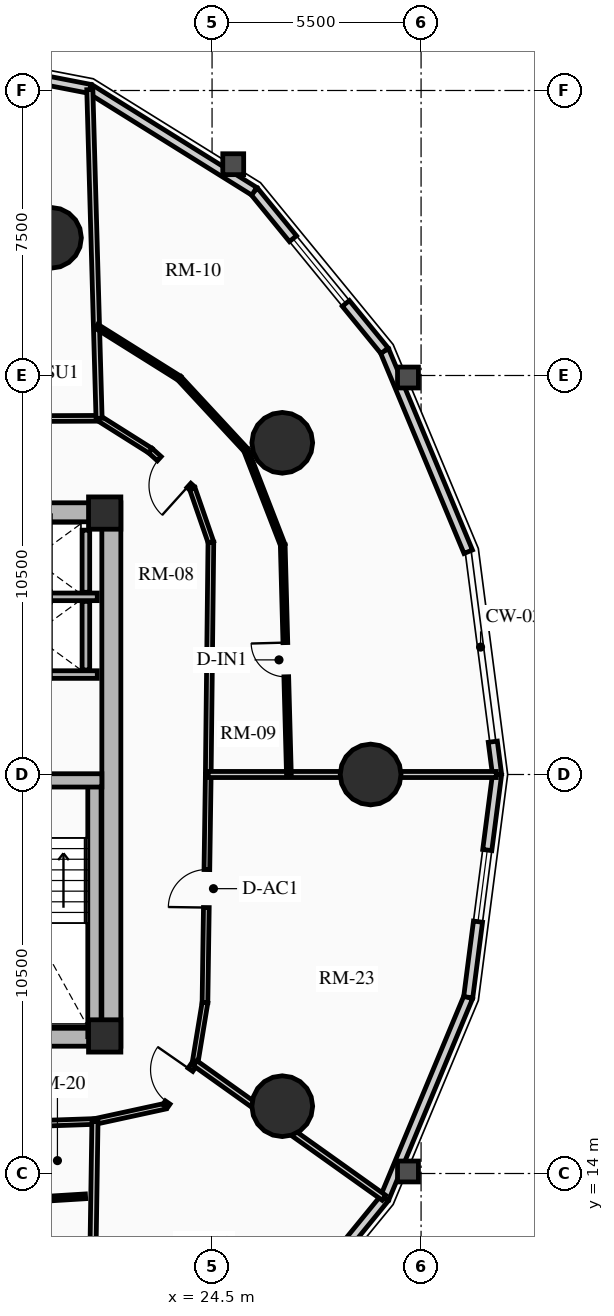
"""IFC4 building model, lengths in metres.
Left out: names, types, materials, properties, quantities, classifications, styles, units other than length and angle.
Written with IfcOpenShell. Run it as: python <this file> out.ifc"""

import sys

from ifc_helpers import new_model, si_unit, direction, frame, frame_2d, origin, origin_2d, place, context, subcontext, project, spatial, rectangle, circle, extrude, source, transform, mapped, element, fill, save


model = new_model("IFC4")
c1 = context("Model", 3, precision=1e-05, world=origin(), true_north=direction((0.0, 1.0)))
c2 = subcontext(c1, "Body", "Model", "MODEL_VIEW")
j1 = project(units=[si_unit("LENGTHUNIT", "METRE"), si_unit("PLANEANGLEUNIT", "RADIAN")], contexts=[c1])
p1 = place(None, origin())
s1 = spatial("IfcSite", under=j1, at=p1, CompositionType="ELEMENT")
p2 = place(p1, origin())
s2 = spatial("IfcBuilding", under=s1, at=p2, CompositionType="ELEMENT")
p3 = place(p2, frame((0.0, 0.0, 45.28)))
s3 = spatial("IfcBuildingStorey", under=s2, at=p3, CompositionType="ELEMENT", Elevation=45.28)
p4 = place(p3, frame((21.85, 17.35, 0.0), z_axis=(0.0, 0.0, 1.0), x_axis=(0.0, 1.0, 0.0)))
e1 = element("IfcWall", 1, at=p4, inside=s3, PredefinedType="SHEAR", context=c2, shape_type="SweptSolid", body=[
    extrude(rectangle(XDim=14.3, YDim=0.5, at=frame_2d((7.15, 0.0))), origin(), (0.0, 0.0, 1.0), 2.91),
])
p5 = place(p3, frame((11.15, 17.6, 0.0), z_axis=(0.0, 0.0, 1.0), x_axis=(1.0, 0.0, 0.0)))
e2 = element("IfcWall", 2, at=p5, inside=s3, PredefinedType="SHEAR", context=c2, shape_type="SweptSolid", body=[
    extrude(rectangle(XDim=10.7, YDim=0.5, at=frame_2d((5.35, 0.0))), origin(), (0.0, 0.0, 1.0), 2.91),
])
m1 = source(origin(), c2, "Body", "SweptSolid", [
    extrude(rectangle(XDim=1.5, YDim=2.02, at=frame_2d((0.75, 1.01))), frame((0.0, 0.26, 0.0), z_axis=(0.0, -1.0, 0.0), x_axis=(1.0, 0.0, 0.0)), (0.0, 0.0, 1.0), 0.52),
])
p6 = place(p5, frame((5.45, 0.0, 0.0)))
e3 = element("IfcOpeningElement", 3, at=p6, cuts=e2, PredefinedType="OPENING", context=c2, shape_type="MappedRepresentation", body=[
    mapped(m1, transform((0.0, 0.0, 0.0), x_axis=(1.0, 0.0, 0.0), y_axis=(0.0, 1.0, 0.0), z_axis=(0.0, 0.0, 1.0), scale=1.0)),
])
p7 = place(p3, frame((11.15, 31.4, 0.0), z_axis=(0.0, 0.0, 1.0), x_axis=(1.0, 0.0, 0.0)))
e4 = element("IfcWall", 4, at=p7, inside=s3, PredefinedType="SHEAR", context=c2, shape_type="SweptSolid", body=[
    extrude(rectangle(XDim=10.7, YDim=0.5, at=frame_2d((5.35, 0.0))), origin(), (0.0, 0.0, 1.0), 2.91),
])
p8 = place(p7, frame((4.6, 0.0, 0.0)))
e5 = element("IfcOpeningElement", 5, at=p8, cuts=e4, PredefinedType="OPENING", context=c2, shape_type="MappedRepresentation", body=[
    mapped(m1, transform((0.0, 0.0, 0.0), x_axis=(1.0, 0.0, 0.0), y_axis=(0.0, 1.0, 0.0), z_axis=(0.0, 0.0, 1.0), scale=1.0)),
])
p9 = place(p3, frame((21.405, 17.6, 0.0), z_axis=(0.0, 0.0, 1.0), x_axis=(0.0, 1.0, 0.0)))
e6 = element("IfcWall", 6, at=p9, inside=s3, PredefinedType="SHEAR", context=c2, shape_type="SweptSolid", body=[
    extrude(rectangle(XDim=6.745, YDim=0.35, at=frame_2d((3.373, 0.0))), origin(), (0.0, 0.0, 1.0), 2.91),
])
p10 = place(p3, frame((18.315, 24.345, 0.0), z_axis=(0.0, 0.0, 1.0), x_axis=(1.0, 0.0, 0.0)))
e7 = element("IfcWall", 7, at=p10, inside=s3, PredefinedType="SHEAR", context=c2, shape_type="SweptSolid", body=[
    extrude(rectangle(XDim=3.285, YDim=0.35, at=frame_2d((1.643, 0.0))), origin(), (0.0, 0.0, 1.0), 2.91),
])
for number, where, z_axis, x_axis in (
    (8, (21.675, 17.62, 0.0), (0.0, 0.0, 1.0), (1.0, 0.0, 0.0)),
    (9, (21.675, 31.38, 0.0), (0.0, 0.0, 1.0), (1.0, 0.0, 0.0)),
):
    element("IfcColumn", number, at=place(p3, frame(where, z_axis=z_axis, x_axis=x_axis)), inside=s3, PredefinedType="COLUMN", context=c2, shape_type="SweptSolid", body=[
        extrude(rectangle(XDim=0.85, YDim=0.85, at=origin_2d()), origin(), (0.0, 0.0, 1.0), 2.91),
    ])
for number, where, z_axis, x_axis in (
    (10, (28.672, 24.5, 0.0), (0.0, 0.0, 1.0), (1.0, 0.0, 0.0)),
    (11, (26.347, 33.229, 0.0), (0.0, 0.0, 1.0), (1.0, 0.0, 0.0)),
    (12, (20.261, 38.623, 0.0), (0.0, 0.0, 1.0), (1.0, 0.0, 0.0)),
    (13, (26.347, 15.771, 0.0), (0.0, 0.0, 1.0), (1.0, 0.0, 0.0)),
):
    element("IfcColumn", number, at=place(p3, frame(where, z_axis=z_axis, x_axis=x_axis)), inside=s3, PredefinedType="USERDEFINED", context=c2, shape_type="SweptSolid", body=[
        extrude(circle(Radius=0.8, at=origin_2d()), origin(), (0.0, 0.0, 1.0), 2.91),
    ])
p11 = place(p3, frame((31.887, 25.363, 0.0), z_axis=(0.0, 0.0, 1.0), x_axis=(0.128523364007, -0.991706481225, 0.0)))
e14 = element("IfcWall", 14, at=p11, inside=s3, PredefinedType="SOLIDWALL", context=c2, shape_type="SweptSolid", body=[
    extrude(rectangle(XDim=0.87, YDim=0.24, at=frame_2d((0.435, 0.0))), origin(), (0.0, 0.0, 1.0), 2.635),
])
p12 = place(p3, frame((29.039, 35.65, 0.0), z_axis=(0.0, 0.0, 1.0), x_axis=(0.38430970593, -0.923204229804, 0.0)))
e15 = element("IfcWall", 15, at=p12, inside=s3, PredefinedType="SOLIDWALL", context=c2, shape_type="SweptSolid", body=[
    extrude(rectangle(XDim=5.728, YDim=0.24, at=frame_2d((2.864, 0.0))), origin(), (0.0, 0.0, 1.0), 2.073),
])
p13 = place(p3, frame((25.61, 39.847, 0.0), z_axis=(0.0, 0.0, 1.0), x_axis=(0.632710215588, -0.774388651189, 0.0)))
e16 = element("IfcWall", 16, at=p13, inside=s3, PredefinedType="SOLIDWALL", context=c2, shape_type="SweptSolid", body=[
    extrude(rectangle(XDim=5.419, YDim=0.24, at=frame_2d((2.71, 0.0))), origin(), (0.0, 0.0, 1.0), 2.073),
])
m2 = source(origin(), c2, "Body", "SweptSolid", [
    extrude(rectangle(XDim=2.2, YDim=1.35, at=frame_2d((1.1, 0.675))), frame((0.0, 0.13, 0.0), z_axis=(0.0, -1.0, 0.0), x_axis=(1.0, 0.0, 0.0)), (0.0, 0.0, 1.0), 0.26),
])
p14 = place(p13, frame((1.61, 0.0, 0.65)))
e17 = element("IfcOpeningElement", 17, at=p14, cuts=e16, PredefinedType="OPENING", context=c2, shape_type="MappedRepresentation", body=[
    mapped(m2, transform((0.0, 0.0, 0.0), x_axis=(1.0, 0.0, 0.0), y_axis=(0.0, 1.0, 0.0), z_axis=(0.0, 0.0, 1.0), scale=1.0)),
])
p15 = place(p3, frame((21.29, 42.542, 0.0), z_axis=(0.0, 0.0, 1.0), x_axis=(0.848528534887, -0.529149624853, 0.0)))
e18 = element("IfcWall", 18, at=p15, inside=s3, PredefinedType="SOLIDWALL", context=c2, shape_type="SweptSolid", body=[
    extrude(rectangle(XDim=5.092, YDim=0.24, at=frame_2d((2.546, 0.0))), origin(), (0.0, 0.0, 1.0), 2.073),
])
p16 = place(p3, frame((16.5, 43.47, 0.0), z_axis=(0.0, 0.0, 1.0), x_axis=(0.981724094622, -0.190309752872, 0.0)))
e19 = element("IfcWall", 19, at=p16, inside=s3, PredefinedType="SOLIDWALL", context=c2, shape_type="SweptSolid", body=[
    extrude(rectangle(XDim=4.879, YDim=0.24, at=frame_2d((2.439, 0.0))), origin(), (0.0, 0.0, 1.0), 2.073),
])
m3 = source(origin(), c2, "Body", "SweptSolid", [
    extrude(rectangle(XDim=1.9, YDim=1.35, at=frame_2d((0.95, 0.675))), frame((0.0, 0.13, 0.0), z_axis=(0.0, -1.0, 0.0), x_axis=(1.0, 0.0, 0.0)), (0.0, 0.0, 1.0), 0.26),
])
p17 = place(p16, frame((1.489, 0.0, 0.65)))
e20 = element("IfcOpeningElement", 20, at=p17, cuts=e19, PredefinedType="OPENING", context=c2, shape_type="MappedRepresentation", body=[
    mapped(m3, transform((0.0, 0.0, 0.0), x_axis=(1.0, 0.0, 0.0), y_axis=(0.0, 1.0, 0.0), z_axis=(0.0, 0.0, 1.0), scale=1.0)),
])
p18 = place(p3, frame((29.039, 13.35, 0.0), z_axis=(0.0, 0.0, 1.0), x_axis=(-0.632710215588, -0.774388651189, 0.0)))
e21 = element("IfcWall", 21, at=p18, inside=s3, PredefinedType="SOLIDWALL", context=c2, shape_type="SweptSolid", body=[
    extrude(rectangle(XDim=5.419, YDim=0.24, at=frame_2d((2.71, 0.0))), origin(), (0.0, 0.0, 1.0), 2.073),
])
p19 = place(p18, frame((1.61, 0.0, 0.65)))
e22 = element("IfcOpeningElement", 22, at=p19, cuts=e21, PredefinedType="OPENING", context=c2, shape_type="MappedRepresentation", body=[
    mapped(m2, transform((0.0, 0.0, 0.0), x_axis=(1.0, 0.0, 0.0), y_axis=(0.0, 1.0, 0.0), z_axis=(0.0, 0.0, 1.0), scale=1.0)),
])
p20 = place(p3, frame((31.24, 18.638, 0.0), z_axis=(0.0, 0.0, 1.0), x_axis=(-0.38430970593, -0.923204229804, 0.0)))
e23 = element("IfcWall", 23, at=p20, inside=s3, PredefinedType="SOLIDWALL", context=c2, shape_type="SweptSolid", body=[
    extrude(rectangle(XDim=5.728, YDim=0.24, at=frame_2d((2.864, 0.0))), origin(), (0.0, 0.0, 1.0), 2.073),
])
p21 = place(p3, frame((31.999, 24.5, 0.0), z_axis=(0.0, 0.0, 1.0), x_axis=(-0.128329107357, -0.991731637191, 0.0)))
e24 = element("IfcWall", 24, at=p21, inside=s3, PredefinedType="SOLIDWALL", context=c2, shape_type="SweptSolid", body=[
    extrude(rectangle(XDim=5.911, YDim=0.24, at=frame_2d((2.956, 0.0))), origin(), (0.0, 0.0, 1.0), 2.073),
])
p22 = place(p21, frame((2.005, 0.0, 0.65)))
e25 = element("IfcOpeningElement", 25, at=p22, cuts=e24, PredefinedType="OPENING", context=c2, shape_type="MappedRepresentation", body=[
    mapped(m3, transform((0.0, 0.0, 0.0), x_axis=(1.0, 0.0, 0.0), y_axis=(0.0, 1.0, 0.0), z_axis=(0.0, 0.0, 1.0), scale=1.0)),
])
for number, where, z_axis, x_axis in (
    (26, (18.51, 27.13, 0.0), (0.0, 0.0, 1.0), (1.0, 0.0, 0.0)),
    (27, (18.51, 29.175, 0.0), (0.0, 0.0, 1.0), (1.0, 0.0, 0.0)),
):
    element("IfcWall", number, at=place(p3, frame(where, z_axis=z_axis, x_axis=x_axis)), inside=s3, PredefinedType="SHEAR", context=c2, shape_type="SweptSolid", body=[
        extrude(rectangle(XDim=2.97, YDim=0.2, at=frame_2d((1.485, 0.0))), origin(), (0.0, 0.0, 1.0), 2.91),
    ])
p23 = place(p3, frame((21.18, 27.25, 0.0), z_axis=(0.0, 0.0, 1.0), x_axis=(0.0, 1.0, 0.0)))
e28 = element("IfcWall", 28, at=p23, inside=s3, PredefinedType="SHEAR", context=c2, shape_type="SweptSolid", body=[
    extrude(rectangle(XDim=1.805, YDim=0.2, at=frame_2d((0.902, 0.0))), origin(), (0.0, 0.0, 1.0), 2.91),
])
p24 = place(p3, frame((21.18, 29.295, 0.0), z_axis=(0.0, 0.0, 1.0), x_axis=(0.0, 1.0, 0.0)))
e29 = element("IfcWall", 29, at=p24, inside=s3, PredefinedType="SHEAR", context=c2, shape_type="SweptSolid", body=[
    extrude(rectangle(XDim=1.635, YDim=0.2, at=frame_2d((0.817, 0.0))), origin(), (0.0, 0.0, 1.0), 2.91),
])
p25 = place(p3, frame((24.4, 24.5, 0.0), z_axis=(0.0, 0.0, 1.0), x_axis=(0.011299841544, 0.999936154752, 0.0)))
e30 = element("IfcWall", 30, at=p25, inside=s3, PredefinedType="PARTITIONING", context=c2, shape_type="SweptSolid", body=[
    extrude(rectangle(XDim=6.115, YDim=0.15, at=frame_2d((3.057, 0.0))), origin(), (0.0, 0.0, 1.0), 2.159),
])
p26 = place(p3, frame((24.469, 30.614, 0.0), z_axis=(0.0, 0.0, 1.0), x_axis=(-0.327228335485, 0.944945298129, 0.0)))
e31 = element("IfcWall", 31, at=p26, inside=s3, PredefinedType="PARTITIONING", context=c2, shape_type="SweptSolid", body=[
    extrude(rectangle(XDim=1.495, YDim=0.15, at=frame_2d((0.748, 0.0))), origin(), (0.0, 0.0, 1.0), 2.205),
])
p27 = place(p3, frame((23.98, 32.027, 0.0), z_axis=(0.0, 0.0, 1.0), x_axis=(-0.742353224332, 0.670008724065, 0.0)))
e32 = element("IfcWall", 32, at=p27, inside=s3, PredefinedType="PARTITIONING", context=c2, shape_type="SweptSolid", body=[
    extrude(rectangle(XDim=1.485, YDim=0.15, at=frame_2d((0.742, 0.0))), origin(), (0.0, 0.0, 1.0), 2.159),
])
m4 = source(origin(), c2, "Body", "SweptSolid", [
    extrude(rectangle(XDim=1.05, YDim=2.015, at=frame_2d((0.525, 1.007))), frame((0.0, 0.085, 0.0), z_axis=(0.0, -1.0, 0.0), x_axis=(1.0, 0.0, 0.0)), (0.0, 0.0, 1.0), 0.17),
])
p28 = place(p27, frame((0.12, 0.0, 0.0)))
e33 = element("IfcOpeningElement", 33, at=p28, cuts=e32, PredefinedType="OPENING", context=c2, shape_type="MappedRepresentation", body=[
    mapped(m4, transform((0.0, 0.0, 0.0), x_axis=(1.0, 0.0, 0.0), y_axis=(0.0, 1.0, 0.0), z_axis=(0.0, 0.0, 1.0), scale=1.0)),
])
p29 = place(p3, frame((22.877, 33.022, 0.0), z_axis=(0.0, 0.0, 1.0), x_axis=(-0.845895608855, 0.533348496689, 0.0)))
e34 = element("IfcWall", 34, at=p29, inside=s3, PredefinedType="PARTITIONING", context=c2, shape_type="SweptSolid", body=[
    extrude(rectangle(XDim=1.597, YDim=0.15, at=frame_2d((0.798, 0.0))), origin(), (0.0, 0.0, 1.0), 2.205),
])
p30 = place(p3, frame((21.527, 33.873, 0.0), z_axis=(0.0, 0.0, 1.0), x_axis=(-0.999991838845, -0.004040079574, 0.0)))
e35 = element("IfcWall", 35, at=p30, inside=s3, PredefinedType="PARTITIONING", context=c2, shape_type="SweptSolid", body=[
    extrude(rectangle(XDim=3.384, YDim=0.15, at=frame_2d((1.692, 0.0))), origin(), (0.0, 0.0, 1.0), 2.159),
])
p31 = place(p30, frame((1.56, 0.0, 0.0)))
e36 = element("IfcOpeningElement", 36, at=p31, cuts=e35, PredefinedType="OPENING", context=c2, shape_type="MappedRepresentation", body=[
    mapped(m4, transform((0.0, 0.0, 0.0), x_axis=(1.0, 0.0, 0.0), y_axis=(0.0, 1.0, 0.0), z_axis=(0.0, 0.0, 1.0), scale=1.0)),
])
p32 = place(p3, frame((14.781, 15.141, 0.0), z_axis=(0.0, 0.0, 1.0), x_axis=(0.999407918707, 0.034406569513, 0.0)))
e37 = element("IfcWall", 37, at=p32, inside=s3, PredefinedType="PARTITIONING", context=c2, shape_type="SweptSolid", body=[
    extrude(rectangle(XDim=6.642, YDim=0.15, at=frame_2d((3.321, 0.0))), origin(), (0.0, 0.0, 1.0), 2.159),
])
p33 = place(p3, frame((21.419, 15.369, 0.0), z_axis=(0.0, 0.0, 1.0), x_axis=(0.977192701953, 0.212354475464, 0.0)))
e38 = element("IfcWall", 38, at=p33, inside=s3, PredefinedType="PARTITIONING", context=c2, shape_type="SweptSolid", body=[
    extrude(rectangle(XDim=1.888, YDim=0.15, at=frame_2d((0.944, 0.0))), origin(), (0.0, 0.0, 1.0), 2.205),
])
p34 = place(p3, frame((23.263, 15.77, 0.0), z_axis=(0.0, 0.0, 1.0), x_axis=(0.570743456919, 0.821128434768, 0.0)))
e39 = element("IfcWall", 39, at=p34, inside=s3, PredefinedType="PARTITIONING", context=c2, shape_type="SweptSolid", body=[
    extrude(rectangle(XDim=1.382, YDim=0.15, at=frame_2d((0.691, 0.0))), origin(), (0.0, 0.0, 1.0), 2.159),
])
p35 = place(p34, frame((0.12, 0.0, 0.0)))
e40 = element("IfcOpeningElement", 40, at=p35, cuts=e39, PredefinedType="OPENING", context=c2, shape_type="MappedRepresentation", body=[
    mapped(m4, transform((0.0, 0.0, 0.0), x_axis=(1.0, 0.0, 0.0), y_axis=(0.0, 1.0, 0.0), z_axis=(0.0, 0.0, 1.0), scale=1.0)),
])
p36 = place(p3, frame((24.052, 16.905, 0.0), z_axis=(0.0, 0.0, 1.0), x_axis=(0.162091534225, 0.986775726562, 0.0)))
e41 = element("IfcWall", 41, at=p36, inside=s3, PredefinedType="PARTITIONING", context=c2, shape_type="SweptSolid", body=[
    extrude(rectangle(XDim=1.613, YDim=0.15, at=frame_2d((0.807, 0.0))), origin(), (0.0, 0.0, 1.0), 2.205),
])
p37 = place(p3, frame((24.313, 18.496, 0.0), z_axis=(0.0, 0.0, 1.0), x_axis=(0.014394019188, 0.999896400739, 0.0)))
e42 = element("IfcWall", 42, at=p37, inside=s3, PredefinedType="PARTITIONING", context=c2, shape_type="SweptSolid", body=[
    extrude(rectangle(XDim=6.004, YDim=0.15, at=frame_2d((3.002, 0.0))), origin(), (0.0, 0.0, 1.0), 2.635),
])
m5 = source(origin(), c2, "Body", "SweptSolid", [
    extrude(rectangle(XDim=1.0, YDim=2.015, at=frame_2d((0.5, 1.007))), frame((0.0, 0.085, 0.0), z_axis=(0.0, -1.0, 0.0), x_axis=(1.0, 0.0, 0.0)), (0.0, 0.0, 1.0), 0.17),
])
p38 = place(p37, frame((2.502, 0.0, 0.0)))
e43 = element("IfcOpeningElement", 43, at=p38, cuts=e42, PredefinedType="OPENING", context=c2, shape_type="MappedRepresentation", body=[
    mapped(m5, transform((0.0, 0.0, 0.0), x_axis=(1.0, 0.0, 0.0), y_axis=(0.0, 1.0, 0.0), z_axis=(0.0, 0.0, 1.0), scale=1.0)),
])
p39 = place(p3, frame((24.4, 24.5, 0.0), z_axis=(0.0, 0.0, 1.0), x_axis=(1.0, 0.0, 0.0)))
e44 = element("IfcWall", 44, at=p39, inside=s3, PredefinedType="PARTITIONING", context=c2, shape_type="SweptSolid", body=[
    extrude(rectangle(XDim=7.579, YDim=0.16, at=frame_2d((3.79, 0.0))), origin(), (0.0, 0.0, 1.0), 2.073),
])
p40 = place(p3, frame((21.527, 33.873, 0.0), z_axis=(0.0, 0.0, 1.0), x_axis=(-0.028159433134, 0.999603444535, 0.0)))
e45 = element("IfcWall", 45, at=p40, inside=s3, PredefinedType="PARTITIONING", context=c2, shape_type="SweptSolid", body=[
    extrude(rectangle(XDim=8.653, YDim=0.16, at=frame_2d((4.326, 0.0))), origin(), (0.0, 0.0, 1.0), 2.073),
])
p41 = place(p3, frame((21.419, 15.369, 0.0), z_axis=(0.0, 0.0, 1.0), x_axis=(-0.015237110632, -0.999883908491, 0.0)))
e46 = element("IfcWall", 46, at=p41, inside=s3, PredefinedType="PARTITIONING", context=c2, shape_type="SweptSolid", body=[
    extrude(rectangle(XDim=8.893, YDim=0.16, at=frame_2d((4.446, 0.0))), origin(), (0.0, 0.0, 1.0), 2.073),
])
p42 = place(p3, frame((24.052, 16.905, 0.0), z_axis=(0.0, 0.0, 1.0), x_axis=(0.814316784985, -0.580420686822, 0.0)))
e47 = element("IfcWall", 47, at=p42, inside=s3, PredefinedType="PARTITIONING", context=c2, shape_type="SweptSolid", body=[
    extrude(rectangle(XDim=6.104, YDim=0.16, at=frame_2d((3.052, 0.0))), origin(), (0.0, 0.0, 1.0), 2.073),
])
p43 = place(p3, frame((26.522, 24.5, 0.0), z_axis=(0.0, 0.0, 1.0), x_axis=(-0.026902612335, 0.999638059224, 0.0)))
e48 = element("IfcWall", 48, at=p43, inside=s3, PredefinedType="PARTITIONING", context=c2, shape_type="SweptSolid", body=[
    extrude(rectangle(XDim=6.044, YDim=0.125, at=frame_2d((3.022, 0.0))), origin(), (0.0, 0.0, 1.0), 2.159),
])
m6 = source(origin(), c2, "Body", "SweptSolid", [
    extrude(rectangle(XDim=0.9, YDim=2.005, at=frame_2d((0.45, 1.002))), frame((0.0, 0.073, 0.0), z_axis=(0.0, -1.0, 0.0), x_axis=(1.0, 0.0, 0.0)), (0.0, 0.0, 1.0), 0.145),
])
p44 = place(p43, frame((2.572, 0.0, 0.0)))
e49 = element("IfcOpeningElement", 49, at=p44, cuts=e48, PredefinedType="OPENING", context=c2, shape_type="MappedRepresentation", body=[
    mapped(m6, transform((0.0, 0.0, 0.0), x_axis=(1.0, 0.0, 0.0), y_axis=(0.0, 1.0, 0.0), z_axis=(0.0, 0.0, 1.0), scale=1.0)),
])
p45 = place(p3, frame((26.36, 30.542, 0.0), z_axis=(0.0, 0.0, 1.0), x_axis=(-0.361464762384, 0.932385770781, 0.0)))
e50 = element("IfcWall", 50, at=p45, inside=s3, PredefinedType="PARTITIONING", context=c2, shape_type="SweptSolid", body=[
    extrude(rectangle(XDim=2.677, YDim=0.125, at=frame_2d((1.339, 0.0))), origin(), (0.0, 0.0, 1.0), 2.159),
])
p46 = place(p3, frame((25.392, 33.038, 0.0), z_axis=(0.0, 0.0, 1.0), x_axis=(-0.67989141147, 0.733312804068, 0.0)))
e51 = element("IfcWall", 51, at=p46, inside=s3, PredefinedType="PARTITIONING", context=c2, shape_type="SweptSolid", body=[
    extrude(rectangle(XDim=2.578, YDim=0.125, at=frame_2d((1.289, 0.0))), origin(), (0.0, 0.0, 1.0), 2.635),
])
p47 = place(p3, frame((23.639, 34.928, 0.0), z_axis=(0.0, 0.0, 1.0), x_axis=(-0.847294097071, 0.531124009125, 0.0)))
e52 = element("IfcWall", 52, at=p47, inside=s3, PredefinedType="PARTITIONING", context=c2, shape_type="SweptSolid", body=[
    extrude(rectangle(XDim=2.574, YDim=0.125, at=frame_2d((1.287, 0.0))), origin(), (0.0, 0.0, 1.0), 2.205),
])
p48 = place(p3, frame((18.181, 13.216, 0.0), z_axis=(0.0, 0.0, 1.0), x_axis=(0.998120468621, 0.061282380177, 0.0)))
e53 = element("IfcWall", 53, at=p48, inside=s3, PredefinedType="PARTITIONING", context=c2, shape_type="SweptSolid", body=[
    extrude(rectangle(XDim=2.996, YDim=0.125, at=frame_2d((1.498, 0.0))), origin(), (0.0, 0.0, 1.0), 2.159),
])
p49 = place(p48, frame((0.12, 0.0, 0.0)))
e54 = element("IfcOpeningElement", 54, at=p49, cuts=e53, PredefinedType="OPENING", context=c2, shape_type="MappedRepresentation", body=[
    mapped(m6, transform((0.0, 0.0, 0.0), x_axis=(1.0, 0.0, 0.0), y_axis=(0.0, 1.0, 0.0), z_axis=(0.0, 0.0, 1.0), scale=1.0)),
])
m7 = source(origin(), c2, "Body", "SweptSolid", [
    extrude(rectangle(XDim=2.2, YDim=1.35, at=frame_2d((1.1, 0.675))), frame((0.0, 0.03, 0.0), z_axis=(0.0, -1.0, 0.0), x_axis=(1.0, 0.0, 0.0)), (0.0, 0.0, 1.0), 0.06),
])
p50 = place(p14, origin())
e55 = element("IfcWindow", 55, at=p50, inside=s3, PartitioningType="DOUBLE_PANEL_VERTICAL", PredefinedType="WINDOW", context=c2, shape_type="MappedRepresentation", body=[
    mapped(m7, transform((0.0, 0.0, 0.0), x_axis=(1.0, 0.0, 0.0), y_axis=(0.0, 1.0, 0.0), z_axis=(0.0, 0.0, 1.0), scale=1.0)),
])
fill(e17, e55)
m8 = source(origin(), c2, "Body", "SweptSolid", [
    extrude(rectangle(XDim=1.9, YDim=1.35, at=frame_2d((0.95, 0.675))), frame((0.0, 0.03, 0.0), z_axis=(0.0, -1.0, 0.0), x_axis=(1.0, 0.0, 0.0)), (0.0, 0.0, 1.0), 0.06),
])
p51 = place(p22, origin())
e56 = element("IfcWindow", 56, at=p51, inside=s3, PartitioningType="DOUBLE_PANEL_VERTICAL", PredefinedType="WINDOW", context=c2, shape_type="MappedRepresentation", body=[
    mapped(m8, transform((0.0, 0.0, 0.0), x_axis=(1.0, 0.0, 0.0), y_axis=(0.0, 1.0, 0.0), z_axis=(0.0, 0.0, 1.0), scale=1.0)),
])
fill(e25, e56)
m9 = source(origin(), c2, "Body", "SweptSolid", [
    extrude(rectangle(XDim=1.05, YDim=2.015, at=frame_2d((0.525, 1.007))), frame((0.0, 0.025, 0.0), z_axis=(0.0, -1.0, 0.0), x_axis=(1.0, 0.0, 0.0)), (0.0, 0.0, 1.0), 0.05),
])
p52 = place(p28, origin())
e57 = element("IfcDoor", 57, at=p52, inside=s3, OperationType="SINGLE_SWING_LEFT", PredefinedType="DOOR", context=c2, shape_type="MappedRepresentation", body=[
    mapped(m9, transform((0.0, 0.0, 0.0), x_axis=(1.0, 0.0, 0.0), y_axis=(0.0, 1.0, 0.0), z_axis=(0.0, 0.0, 1.0), scale=1.0)),
])
fill(e33, e57)
m10 = source(origin(), c2, "Body", "SweptSolid", [
    extrude(rectangle(XDim=0.9, YDim=2.005, at=frame_2d((0.45, 1.002))), frame((0.0, 0.025, 0.0), z_axis=(0.0, -1.0, 0.0), x_axis=(1.0, 0.0, 0.0)), (0.0, 0.0, 1.0), 0.05),
])
p53 = place(p44, origin())
e58 = element("IfcDoor", 58, at=p53, inside=s3, OperationType="SINGLE_SWING_RIGHT", PredefinedType="DOOR", context=c2, shape_type="MappedRepresentation", body=[
    mapped(m10, transform((0.0, 0.0, 0.0), x_axis=(1.0, 0.0, 0.0), y_axis=(0.0, 1.0, 0.0), z_axis=(0.0, 0.0, 1.0), scale=1.0)),
])
fill(e49, e58)
p54 = place(p35, origin())
e59 = element("IfcDoor", 59, at=p54, inside=s3, OperationType="SINGLE_SWING_RIGHT", PredefinedType="DOOR", context=c2, shape_type="MappedRepresentation", body=[
    mapped(m9, transform((0.0, 0.0, 0.0), x_axis=(1.0, 0.0, 0.0), y_axis=(0.0, 1.0, 0.0), z_axis=(0.0, 0.0, 1.0), scale=1.0)),
])
fill(e40, e59)
m11 = source(origin(), c2, "Body", "SweptSolid", [
    extrude(rectangle(XDim=1.0, YDim=2.015, at=frame_2d((0.5, 1.007))), frame((0.0, 0.025, 0.0), z_axis=(0.0, -1.0, 0.0), x_axis=(1.0, 0.0, 0.0)), (0.0, 0.0, 1.0), 0.05),
])
p55 = place(p38, origin())
e60 = element("IfcDoor", 60, at=p55, inside=s3, OperationType="SINGLE_SWING_LEFT", PredefinedType="DOOR", context=c2, shape_type="MappedRepresentation", body=[
    mapped(m11, transform((0.0, 0.0, 0.0), x_axis=(1.0, 0.0, 0.0), y_axis=(0.0, 1.0, 0.0), z_axis=(0.0, 0.0, 1.0), scale=1.0)),
])
fill(e43, e60)
save(model, sys.argv[1])
